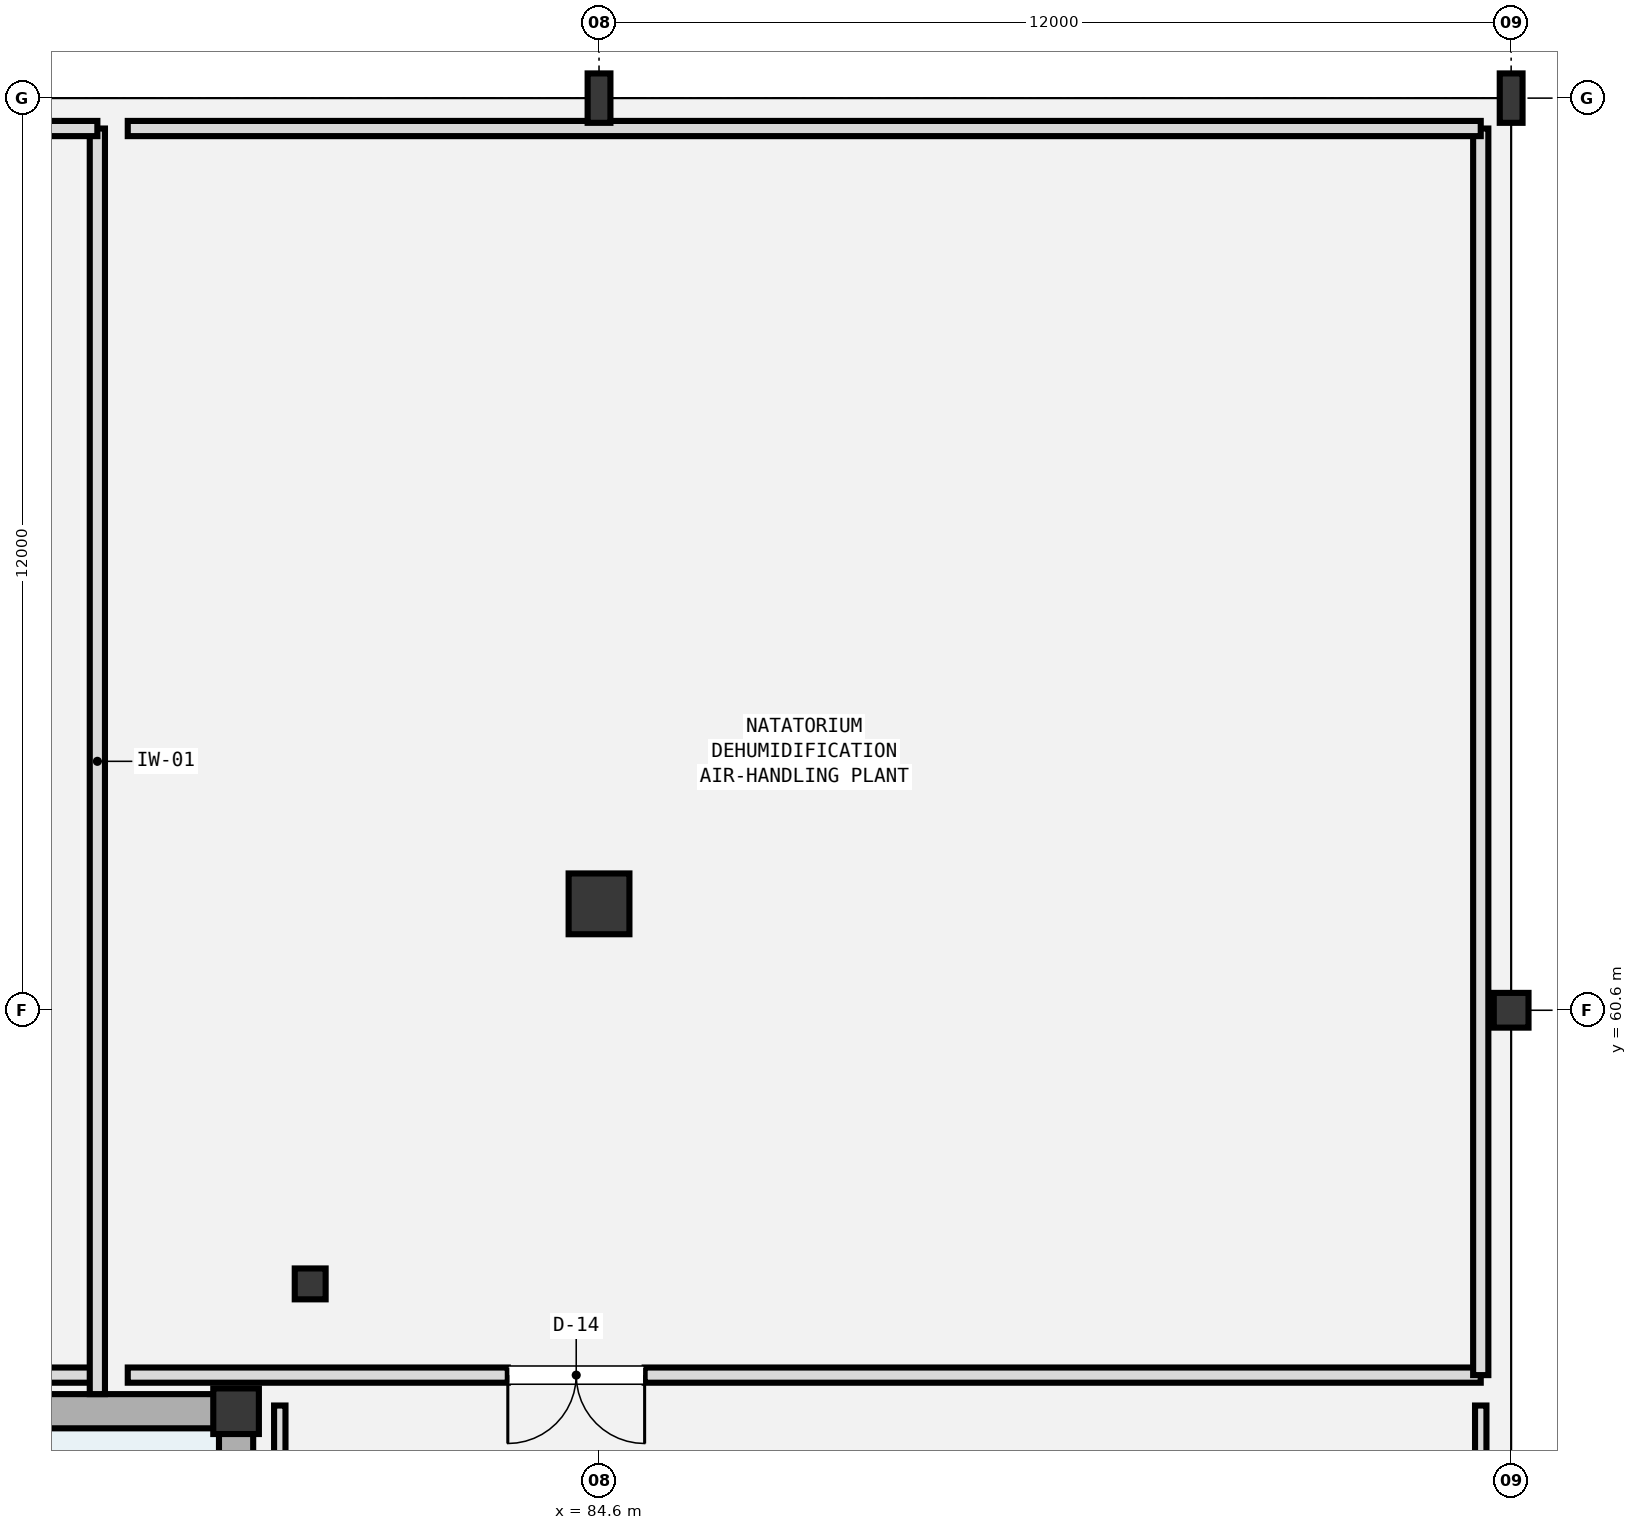
"""IFC4 building model, lengths in metres.
Left out: names, types, materials, properties, quantities, classifications, styles, units other than length and angle.
Written with IfcOpenShell. Run it as: python <this file> out.ifc"""

import sys

from ifc_helpers import new_model, si_unit, direction, frame, frame_2d, origin, origin_2d, place, context, subcontext, project, spatial, rectangle, circle, hollow_circle, i_section, extrude, element, fill, save


model = new_model("IFC4")
c1 = context("Model", 3, precision=1e-05, world=origin(), true_north=direction((0.0, 1.0)))
c2 = subcontext(c1, "Body", "Model", "MODEL_VIEW")
j1 = project(units=[si_unit("LENGTHUNIT", "METRE"), si_unit("PLANEANGLEUNIT", "RADIAN")], contexts=[c1])
p1 = place(None, origin())
s1 = spatial("IfcSite", under=j1, at=p1, CompositionType="ELEMENT")
p2 = place(p1, origin())
s2 = spatial("IfcBuilding", under=s1, at=p2, CompositionType="ELEMENT")
p3 = place(p2, frame((0.0, 0.0, -5.4)))
s3 = spatial("IfcBuildingStorey", under=s2, at=p3, CompositionType="ELEMENT", Elevation=-5.4)
p4 = place(p3, frame((79.825, 55.325, -0.55), z_axis=(0.0, 0.0, 1.0), x_axis=(1.0, 0.0, 0.0)))
e1 = element("IfcColumn", 1, at=p4, inside=s3, PredefinedType="COLUMN", context=c2, shape_type="SweptSolid", body=[
    extrude(rectangle(XDim=0.6, YDim=0.6, at=origin_2d()), origin(), (0.0, 0.0, 1.0), 3.05),
])
p5 = place(p3, frame((29.15, 55.325, 3.2), z_axis=(0.0, 0.0, 1.0), x_axis=(1.0, 0.0, 0.0)))
e2 = element("IfcWall", 2, at=p5, inside=s3, PredefinedType="SOLIDWALL", context=c2, shape_type="SweptSolid", body=[
    extrude(rectangle(XDim=50.9, YDim=0.45, at=frame_2d((25.45, 0.0))), origin(), (0.0, 0.0, 1.0), 1.86),
])
p6 = place(p3, frame((79.825, 30.1, 3.2), z_axis=(0.0, 0.0, 1.0), x_axis=(0.0, 1.0, 0.0)))
e3 = element("IfcWall", 3, at=p6, inside=s3, PredefinedType="SOLIDWALL", context=c2, shape_type="SweptSolid", body=[
    extrude(rectangle(XDim=25.0, YDim=0.45, at=frame_2d((12.5, 0.0))), origin(), (0.0, 0.0, 1.0), 1.86),
])
p7 = place(p3, frame((84.6, 62.0, -0.55), z_axis=(0.0, 0.0, 1.0), x_axis=(1.0, 0.0, 0.0)))
e4 = element("IfcColumn", 4, at=p7, inside=s3, PredefinedType="COLUMN", context=c2, shape_type="SweptSolid", body=[
    extrude(circle(Radius=0.4, at=origin_2d()), origin(), (0.0, 0.0, 1.0), 5.95),
])
p8 = place(p3, frame((84.6, 72.6, -0.55), z_axis=(0.0, 0.0, 1.0), x_axis=(1.0, 0.0, 0.0)))
e5 = element("IfcColumn", 5, at=p8, inside=s3, PredefinedType="COLUMN", context=c2, shape_type="SweptSolid", body=[
    extrude(i_section(OverallWidth=0.3, OverallDepth=0.65, WebThickness=0.016, FlangeThickness=0.031, FilletRadius=0.027, at=origin_2d()), origin(), (0.0, 0.0, 1.0), 5.95),
])
p9 = place(p3, frame((96.6, 60.6, -0.55), z_axis=(0.0, 0.0, 1.0), x_axis=(1.0, 0.0, 0.0)))
e6 = element("IfcColumn", 6, at=p9, inside=s3, PredefinedType="COLUMN", context=c2, shape_type="SweptSolid", body=[
    extrude(hollow_circle(Radius=0.229, WallThickness=0.016, at=origin_2d()), origin(), (0.0, 0.0, 1.0), 5.95),
])
p10 = place(p3, frame((96.6, 72.6, -0.55), z_axis=(0.0, 0.0, 1.0), x_axis=(1.0, 0.0, 0.0)))
e7 = element("IfcColumn", 7, at=p10, inside=s3, PredefinedType="COLUMN", context=c2, shape_type="SweptSolid", body=[
    extrude(i_section(OverallWidth=0.3, OverallDepth=0.65, WebThickness=0.016, FlangeThickness=0.031, FilletRadius=0.027, at=origin_2d()), origin(), (0.0, 0.0, 1.0), 5.95),
])
p11 = place(p3, frame((80.8, 57.0, 0.0), z_axis=(0.0, 0.0, 1.0), x_axis=(1.0, 0.0, 0.0)))
e8 = element("IfcColumn", 8, at=p11, inside=s3, PredefinedType="COLUMN", context=c2, shape_type="SweptSolid", body=[
    extrude(hollow_circle(Radius=0.203, WallThickness=0.016, at=origin_2d()), origin(), (0.0, 0.0, 1.0), 4.98),
])
p12 = place(p3, frame((58.4, 55.8, 0.0), z_axis=(0.0, 0.0, 1.0), x_axis=(1.0, 0.0, 0.0)))
e9 = element("IfcWall", 9, at=p12, inside=s3, PredefinedType="SOLIDWALL", context=c2, shape_type="SweptSolid", body=[
    extrude(rectangle(XDim=19.6, YDim=0.2, at=frame_2d((9.8, 0.0))), origin(), (0.0, 0.0, 1.0), 3.8),
])
p13 = place(p12, frame((5.0, 0.0, 0.0)))
e10 = element("IfcOpeningElement", 10, at=p13, cuts=e9, PredefinedType="OPENING", context=c2, shape_type="SweptSolid", body=[
    extrude(rectangle(XDim=1.8, YDim=2.4, at=frame_2d((0.9, 1.2))), frame((0.0, 0.11, 0.0), z_axis=(0.0, -1.0, 0.0), x_axis=(1.0, 0.0, 0.0)), (0.0, 0.0, 1.0), 0.22),
])
p14 = place(p3, frame((78.0, 55.55, 0.0), z_axis=(0.0, 0.0, 1.0), x_axis=(0.0, 1.0, 0.0)))
e11 = element("IfcWall", 11, at=p14, inside=s3, PredefinedType="SOLIDWALL", context=c2, shape_type="SweptSolid", body=[
    extrude(rectangle(XDim=16.65, YDim=0.2, at=frame_2d((8.325, 0.0))), origin(), (0.0, 0.0, 1.0), 3.8),
])
p15 = place(p3, frame((58.4, 72.2, 0.0), z_axis=(0.0, 0.0, 1.0), x_axis=(1.0, 0.0, 0.0)))
e12 = element("IfcWall", 12, at=p15, inside=s3, PredefinedType="SOLIDWALL", context=c2, shape_type="SweptSolid", body=[
    extrude(rectangle(XDim=19.6, YDim=0.2, at=frame_2d((9.8, 0.0))), origin(), (0.0, 0.0, 1.0), 3.78),
])
p16 = place(p3, frame((78.4, 55.8, 0.0), z_axis=(0.0, 0.0, 1.0), x_axis=(1.0, 0.0, 0.0)))
e13 = element("IfcWall", 13, at=p16, inside=s3, PredefinedType="SOLIDWALL", context=c2, shape_type="SweptSolid", body=[
    extrude(rectangle(XDim=17.8, YDim=0.2, at=frame_2d((8.9, 0.0))), origin(), (0.0, 0.0, 1.0), 3.8),
])
p17 = place(p16, frame((5.0, 0.0, 0.0)))
e14 = element("IfcOpeningElement", 14, at=p17, cuts=e13, PredefinedType="OPENING", context=c2, shape_type="SweptSolid", body=[
    extrude(rectangle(XDim=1.8, YDim=2.4, at=frame_2d((0.9, 1.2))), frame((0.0, 0.11, 0.0), z_axis=(0.0, -1.0, 0.0), x_axis=(1.0, 0.0, 0.0)), (0.0, 0.0, 1.0), 0.22),
])
p18 = place(p3, frame((96.2, 55.8, 0.0), z_axis=(0.0, 0.0, 1.0), x_axis=(0.0, 1.0, 0.0)))
e15 = element("IfcWall", 15, at=p18, inside=s3, PredefinedType="SOLIDWALL", context=c2, shape_type="SweptSolid", body=[
    extrude(rectangle(XDim=16.4, YDim=0.2, at=frame_2d((8.2, 0.0))), origin(), (0.0, 0.0, 1.0), 3.8),
])
p19 = place(p3, frame((78.4, 72.2, 0.0), z_axis=(0.0, 0.0, 1.0), x_axis=(1.0, 0.0, 0.0)))
e16 = element("IfcWall", 16, at=p19, inside=s3, PredefinedType="SOLIDWALL", context=c2, shape_type="SweptSolid", body=[
    extrude(rectangle(XDim=17.8, YDim=0.2, at=frame_2d((8.9, 0.0))), origin(), (0.0, 0.0, 1.0), 3.78),
])
for number, where, z_axis, x_axis in (
    (17, (80.4, 29.8, 0.0), (0.0, 0.0, 1.0), (0.0, 1.0, 0.0)),
    (18, (96.2, 29.8, 0.0), (0.0, 0.0, 1.0), (0.0, 1.0, 0.0)),
):
    element("IfcWall", number, at=place(p3, frame(where, z_axis=z_axis, x_axis=x_axis)), inside=s3, PredefinedType="PARTITIONING", context=c2, shape_type="SweptSolid", body=[
        extrude(rectangle(XDim=25.6, YDim=0.15, at=frame_2d((12.8, 0.0))), origin(), (0.0, 0.0, 1.0), 3.8),
    ])
p20 = place(p17, frame((1.8, 0.0, 0.0), z_axis=(0.0, 0.0, 1.0), x_axis=(-1.0, 0.0, 0.0)))
e19 = element("IfcDoor", 19, at=p20, inside=s3, OperationType="DOUBLE_DOOR_SINGLE_SWING", PredefinedType="DOOR", context=c2, shape_type="SweptSolid", body=[
    extrude(rectangle(XDim=1.8, YDim=2.4, at=frame_2d((0.9, 1.2))), frame((0.0, 0.025, 0.0), z_axis=(0.0, -1.0, 0.0), x_axis=(1.0, 0.0, 0.0)), (0.0, 0.0, 1.0), 0.05),
])
fill(e14, e19)
save(model, sys.argv[1])
